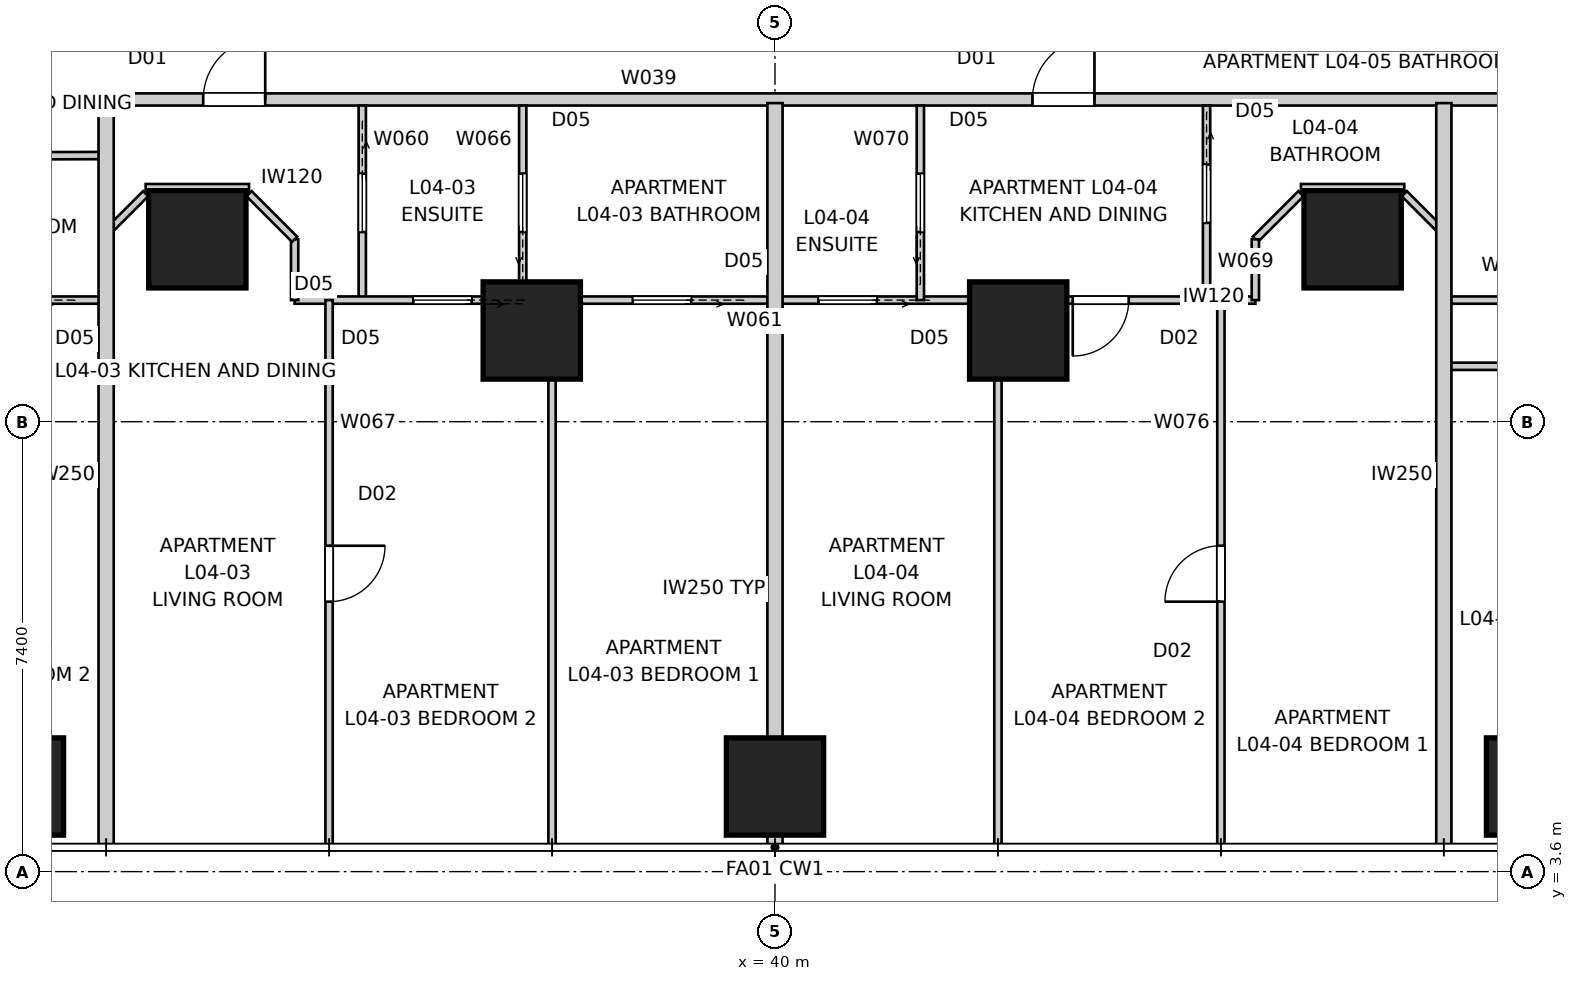
"""IFC4 building model, lengths in metres.
Left out: names, types, materials, properties, quantities, classifications, styles, units other than length and angle.
Written with IfcOpenShell. Run it as: python <this file> out.ifc"""

import sys

from ifc_helpers import new_model, si_unit, direction, frame, frame_2d, origin, origin_2d, place, context, subcontext, project, spatial, rectangle, extrude, element, fill, save


model = new_model("IFC4")
c1 = context("Model", 3, precision=1e-05, world=origin(), true_north=direction((0.0, 1.0)))
c2 = subcontext(c1, "Body", "Model", "MODEL_VIEW")
j1 = project(units=[si_unit("LENGTHUNIT", "METRE"), si_unit("PLANEANGLEUNIT", "RADIAN")], contexts=[c1])
p1 = place(None, origin())
s1 = spatial("IfcSite", under=j1, at=p1, CompositionType="ELEMENT")
p2 = place(p1, origin())
s2 = spatial("IfcBuilding", under=s1, at=p2, CompositionType="ELEMENT")
p3 = place(p2, frame((0.0, 0.0, 18.4)))
s3 = spatial("IfcBuildingStorey", under=s2, at=p3, CompositionType="ELEMENT", Elevation=18.4)
for number, where, z_axis, x_axis in (
    (1, (27.5, 5.0, 0.0), (0.0, 0.0, 1.0), (1.0, 0.0, 0.0)),
    (2, (40.0, 5.0, 0.0), (0.0, 0.0, 1.0), (1.0, 0.0, 0.0)),
    (3, (52.5, 5.0, 0.0), (0.0, 0.0, 1.0), (1.0, 0.0, 0.0)),
    (4, (30.5, 14.0, 0.0), (0.0, 0.0, 1.0), (1.0, 0.0, 0.0)),
    (5, (36.0, 12.5, 0.0), (0.0, 0.0, 1.0), (1.0, 0.0, 0.0)),
    (6, (44.0, 12.5, 0.0), (0.0, 0.0, 1.0), (1.0, 0.0, 0.0)),
    (7, (49.5, 14.0, 0.0), (0.0, 0.0, 1.0), (1.0, 0.0, 0.0)),
):
    element("IfcColumn", number, at=place(p3, frame(where, z_axis=z_axis, x_axis=x_axis)), inside=s3, PredefinedType="COLUMN", context=c2, shape_type="SweptSolid", body=[
        extrude(rectangle(XDim=1.6, YDim=1.6, at=origin_2d()), origin(), (0.0, 0.0, 1.0), 3.4),
    ])
p4 = place(p3, frame((25.5, 16.3, 0.0), z_axis=(0.0, 0.0, 1.0), x_axis=(1.0, 0.0, 0.0)))
e8 = element("IfcWall", 8, at=p4, inside=s3, PredefinedType="PARTITIONING", context=c2, shape_type="SweptSolid", body=[
    extrude(rectangle(XDim=29.0, YDim=0.2, at=frame_2d((14.5, 0.0))), origin(), (0.0, 0.0, 1.0), 3.25),
])
p5 = place(p4, frame((18.734, 0.0, 0.0)))
e9 = element("IfcOpeningElement", 9, at=p5, cuts=e8, PredefinedType="OPENING", context=c2, shape_type="SweptSolid", body=[
    extrude(rectangle(XDim=1.02, YDim=2.34, at=frame_2d((0.51, 1.17))), frame((0.0, 0.11, 0.0), z_axis=(0.0, -1.0, 0.0), x_axis=(1.0, 0.0, 0.0)), (0.0, 0.0, 1.0), 0.22),
])
p6 = place(p4, frame((5.096, 0.0, 0.0)))
e10 = element("IfcOpeningElement", 10, at=p6, cuts=e8, PredefinedType="OPENING", context=c2, shape_type="SweptSolid", body=[
    extrude(rectangle(XDim=1.02, YDim=2.34, at=frame_2d((0.51, 1.17))), frame((0.0, 0.11, 0.0), z_axis=(0.0, -1.0, 0.0), x_axis=(1.0, 0.0, 0.0)), (0.0, 0.0, 1.0), 0.22),
])
p7 = place(p3, frame((29.0, 4.0, 0.0), z_axis=(0.0, 0.0, 1.0), x_axis=(0.0, 1.0, 0.0)))
e11 = element("IfcWall", 11, at=p7, inside=s3, PredefinedType="PARTITIONING", context=c2, shape_type="SweptSolid", body=[
    extrude(rectangle(XDim=12.24, YDim=0.25, at=frame_2d((6.12, 0.0))), origin(), (0.0, 0.0, 1.0), 3.25),
])
p8 = place(p3, frame((40.0, 4.0, 0.0), z_axis=(0.0, 0.0, 1.0), x_axis=(0.0, 1.0, 0.0)))
e12 = element("IfcWall", 12, at=p8, inside=s3, PredefinedType="PARTITIONING", context=c2, shape_type="SweptSolid", body=[
    extrude(rectangle(XDim=8.5, YDim=0.25, at=frame_2d((4.25, 0.0))), origin(), (0.0, 0.0, 1.0), 3.25),
])
p9 = place(p3, frame((40.0, 12.5, 0.0), z_axis=(0.0, 0.0, 1.0), x_axis=(0.0, 1.0, 0.0)))
e13 = element("IfcWall", 13, at=p9, inside=s3, PredefinedType="PARTITIONING", context=c2, shape_type="SweptSolid", body=[
    extrude(rectangle(XDim=3.74, YDim=0.25, at=frame_2d((1.87, 0.0))), origin(), (0.0, 0.0, 1.0), 2.795),
])
p10 = place(p3, frame((51.0, 4.0, 0.0), z_axis=(0.0, 0.0, 1.0), x_axis=(0.0, 1.0, 0.0)))
e14 = element("IfcWall", 14, at=p10, inside=s3, PredefinedType="PARTITIONING", context=c2, shape_type="SweptSolid", body=[
    extrude(rectangle(XDim=12.24, YDim=0.25, at=frame_2d((6.12, 0.0))), origin(), (0.0, 0.0, 1.0), 3.25),
])
p11 = place(p3, frame((29.0, 15.378, 0.0), z_axis=(0.0, 0.0, 1.0), x_axis=(-0.999995589081, -0.002970154664, 0.0)))
e15 = element("IfcWall", 15, at=p11, inside=s3, PredefinedType="PARTITIONING", context=c2, shape_type="SweptSolid", body=[
    extrude(rectangle(XDim=14.96, YDim=0.12, at=frame_2d((7.48, 0.0))), origin(), (0.0, 0.0, 1.0), 2.638),
])
p12 = place(p11, frame((3.57, 0.0, 0.0)))
e16 = element("IfcOpeningElement", 16, at=p12, cuts=e15, PredefinedType="OPENING", context=c2, shape_type="SweptSolid", body=[
    extrude(rectangle(XDim=0.96, YDim=2.1, at=frame_2d((0.48, 1.05))), frame((0.0, 0.07, 0.0), z_axis=(0.0, -1.0, 0.0), x_axis=(1.0, 0.0, 0.0)), (0.0, 0.0, 1.0), 0.14),
])
p13 = place(p3, frame((29.0, 13.0, 0.0), z_axis=(0.0, 0.0, 1.0), x_axis=(-1.0, 0.0, 0.0)))
e17 = element("IfcWall", 17, at=p13, inside=s3, PredefinedType="PARTITIONING", context=c2, shape_type="SweptSolid", body=[
    extrude(rectangle(XDim=6.0, YDim=0.12, at=frame_2d((3.0, 0.0))), origin(), (0.0, 0.0, 1.0), 3.25),
])
p14 = place(p13, frame((1.378, 0.0, 0.0)))
e18 = element("IfcOpeningElement", 18, at=p14, cuts=e17, PredefinedType="OPENING", context=c2, shape_type="SweptSolid", body=[
    extrude(rectangle(XDim=0.96, YDim=2.1, at=frame_2d((0.48, 1.05))), frame((0.0, 0.07, 0.0), z_axis=(0.0, -1.0, 0.0), x_axis=(1.0, 0.0, 0.0)), (0.0, 0.0, 1.0), 0.14),
])
p15 = place(p13, frame((4.328, 0.0, 0.0)))
e19 = element("IfcOpeningElement", 19, at=p15, cuts=e17, PredefinedType="OPENING", context=c2, shape_type="SweptSolid", body=[
    extrude(rectangle(XDim=0.96, YDim=2.1, at=frame_2d((0.48, 1.05))), frame((0.0, 0.07, 0.0), z_axis=(0.0, -1.0, 0.0), x_axis=(1.0, 0.0, 0.0)), (0.0, 0.0, 1.0), 0.14),
])
p16 = place(p3, frame((33.212, 16.2, 0.0), z_axis=(0.0, 0.0, 1.0), x_axis=(0.0, -1.0, 0.0)))
e20 = element("IfcWall", 20, at=p16, inside=s3, PredefinedType="PARTITIONING", context=c2, shape_type="SweptSolid", body=[
    extrude(rectangle(XDim=3.2, YDim=0.12, at=frame_2d((1.6, 0.0))), origin(), (0.0, 0.0, 1.0), 3.25),
])
p17 = place(p16, frame((1.12, 0.0, 0.0)))
e21 = element("IfcOpeningElement", 21, at=p17, cuts=e20, PredefinedType="OPENING", context=c2, shape_type="SweptSolid", body=[
    extrude(rectangle(XDim=0.96, YDim=2.1, at=frame_2d((0.48, 1.05))), frame((0.0, 0.07, 0.0), z_axis=(0.0, -1.0, 0.0), x_axis=(1.0, 0.0, 0.0)), (0.0, 0.0, 1.0), 0.14),
])
p18 = place(p3, frame((47.9, 13.0, 0.0), z_axis=(0.0, 0.0, 1.0), x_axis=(-1.0, 0.0, 0.0)))
e22 = element("IfcWall", 22, at=p18, inside=s3, PredefinedType="PARTITIONING", context=c2, shape_type="SweptSolid", body=[
    extrude(rectangle(XDim=15.8, YDim=0.12, at=frame_2d((7.9, 0.0))), origin(), (0.0, 0.0, 1.0), 2.55),
])
p19 = place(p18, frame((2.083, 0.0, 0.0)))
e23 = element("IfcOpeningElement", 23, at=p19, cuts=e22, PredefinedType="OPENING", context=c2, shape_type="SweptSolid", body=[
    extrude(rectangle(XDim=0.92, YDim=2.34, at=frame_2d((0.46, 1.17))), frame((0.0, 0.07, 0.0), z_axis=(0.0, -1.0, 0.0), x_axis=(1.0, 0.0, 0.0)), (0.0, 0.0, 1.0), 0.14),
])
p20 = place(p18, frame((6.225, 0.0, 0.0)))
e24 = element("IfcOpeningElement", 24, at=p20, cuts=e22, PredefinedType="OPENING", context=c2, shape_type="SweptSolid", body=[
    extrude(rectangle(XDim=0.96, YDim=2.1, at=frame_2d((0.48, 1.05))), frame((0.0, 0.07, 0.0), z_axis=(0.0, -1.0, 0.0), x_axis=(1.0, 0.0, 0.0)), (0.0, 0.0, 1.0), 0.14),
])
p21 = place(p18, frame((12.888, 0.0, 0.0)))
e25 = element("IfcOpeningElement", 25, at=p21, cuts=e22, PredefinedType="OPENING", context=c2, shape_type="SweptSolid", body=[
    extrude(rectangle(XDim=0.96, YDim=2.1, at=frame_2d((0.48, 1.05))), frame((0.0, 0.07, 0.0), z_axis=(0.0, -1.0, 0.0), x_axis=(1.0, 0.0, 0.0)), (0.0, 0.0, 1.0), 0.14),
])
p22 = place(p18, frame((9.278, 0.0, 0.0)))
e26 = element("IfcOpeningElement", 26, at=p22, cuts=e22, PredefinedType="OPENING", context=c2, shape_type="SweptSolid", body=[
    extrude(rectangle(XDim=0.96, YDim=2.1, at=frame_2d((0.48, 1.05))), frame((0.0, 0.07, 0.0), z_axis=(0.0, -1.0, 0.0), x_axis=(1.0, 0.0, 0.0)), (0.0, 0.0, 1.0), 0.14),
])
p23 = place(p3, frame((32.1, 13.0, 0.0), z_axis=(0.0, 0.0, 1.0), x_axis=(0.0, 1.0, 0.0)))
e27 = element("IfcWall", 27, at=p23, inside=s3, PredefinedType="PARTITIONING", context=c2, shape_type="SweptSolid", body=[
    extrude(rectangle(XDim=1.0, YDim=0.12, at=frame_2d((0.5, 0.0))), origin(), (0.0, 0.0, 1.0), 3.25),
])
p24 = place(p3, frame((32.1, 14.0, 0.0), z_axis=(0.0, 0.0, 1.0), x_axis=(-0.707106781187, 0.707106781187, 0.0)))
e28 = element("IfcWall", 28, at=p24, inside=s3, PredefinedType="PARTITIONING", context=c2, shape_type="SweptSolid", body=[
    extrude(rectangle(XDim=1.061, YDim=0.12, at=frame_2d((0.53, 0.0))), origin(), (0.0, 0.0, 1.0), 3.25),
])
p25 = place(p3, frame((31.35, 14.85, 0.0), z_axis=(0.0, 0.0, 1.0), x_axis=(-1.0, 0.0, 0.0)))
e29 = element("IfcWall", 29, at=p25, inside=s3, PredefinedType="PARTITIONING", context=c2, shape_type="SweptSolid", body=[
    extrude(rectangle(XDim=1.7, YDim=0.12, at=frame_2d((0.85, 0.0))), origin(), (0.0, 0.0, 1.0), 3.25),
])
p26 = place(p3, frame((29.65, 14.75, 0.0), z_axis=(0.0, 0.0, 1.0), x_axis=(-0.707106781187, -0.707106781187, 0.0)))
e30 = element("IfcWall", 30, at=p26, inside=s3, PredefinedType="PARTITIONING", context=c2, shape_type="SweptSolid", body=[
    extrude(rectangle(XDim=0.919, YDim=0.12, at=frame_2d((0.459, 0.0))), origin(), (0.0, 0.0, 1.0), 3.25),
])
p27 = place(p3, frame((35.851, 13.0, 0.0), z_axis=(0.0, 0.0, 1.0), x_axis=(0.0, 1.0, 0.0)))
e31 = element("IfcWall", 31, at=p27, inside=s3, PredefinedType="PARTITIONING", context=c2, shape_type="SweptSolid", body=[
    extrude(rectangle(XDim=3.2, YDim=0.12, at=frame_2d((1.6, 0.0))), origin(), (0.0, 0.0, 1.0), 3.25),
])
p28 = place(p27, frame((1.12, 0.0, 0.0)))
e32 = element("IfcOpeningElement", 32, at=p28, cuts=e31, PredefinedType="OPENING", context=c2, shape_type="SweptSolid", body=[
    extrude(rectangle(XDim=0.96, YDim=2.1, at=frame_2d((0.48, 1.05))), frame((0.0, 0.07, 0.0), z_axis=(0.0, -1.0, 0.0), x_axis=(1.0, 0.0, 0.0)), (0.0, 0.0, 1.0), 0.14),
])
p29 = place(p3, frame((32.667, 13.0, 0.0), z_axis=(0.0, 0.0, 1.0), x_axis=(0.0, -1.0, 0.0)))
e33 = element("IfcWall", 33, at=p29, inside=s3, PredefinedType="PARTITIONING", context=c2, shape_type="SweptSolid", body=[
    extrude(rectangle(XDim=8.96, YDim=0.12, at=frame_2d((4.48, 0.0))), origin(), (0.0, 0.0, 1.0), 3.25),
])
p30 = place(p29, frame((4.04, 0.0, 0.0)))
e34 = element("IfcOpeningElement", 34, at=p30, cuts=e33, PredefinedType="OPENING", context=c2, shape_type="SweptSolid", body=[
    extrude(rectangle(XDim=0.92, YDim=2.34, at=frame_2d((0.46, 1.17))), frame((0.0, 0.07, 0.0), z_axis=(0.0, -1.0, 0.0), x_axis=(1.0, 0.0, 0.0)), (0.0, 0.0, 1.0), 0.14),
])
p31 = place(p3, frame((36.333, 4.04, 0.0), z_axis=(0.0, 0.0, 1.0), x_axis=(0.0, 1.0, 0.0)))
e35 = element("IfcWall", 35, at=p31, inside=s3, PredefinedType="PARTITIONING", context=c2, shape_type="SweptSolid", body=[
    extrude(rectangle(XDim=8.96, YDim=0.12, at=frame_2d((4.48, 0.0))), origin(), (0.0, 0.0, 1.0), 3.25),
])
p32 = place(p3, frame((47.098, 16.2, 0.0), z_axis=(0.0, 0.0, 1.0), x_axis=(0.0, -1.0, 0.0)))
e36 = element("IfcWall", 36, at=p32, inside=s3, PredefinedType="PARTITIONING", context=c2, shape_type="SweptSolid", body=[
    extrude(rectangle(XDim=3.2, YDim=0.12, at=frame_2d((1.6, 0.0))), origin(), (0.0, 0.0, 1.0), 3.25),
])
p33 = place(p32, frame((0.97, 0.0, 0.0)))
e37 = element("IfcOpeningElement", 37, at=p33, cuts=e36, PredefinedType="OPENING", context=c2, shape_type="SweptSolid", body=[
    extrude(rectangle(XDim=0.96, YDim=2.1, at=frame_2d((0.48, 1.05))), frame((0.0, 0.07, 0.0), z_axis=(0.0, -1.0, 0.0), x_axis=(1.0, 0.0, 0.0)), (0.0, 0.0, 1.0), 0.14),
])
p34 = place(p3, frame((42.391, 13.0, 0.0), z_axis=(0.0, 0.0, 1.0), x_axis=(0.0, 1.0, 0.0)))
e38 = element("IfcWall", 38, at=p34, inside=s3, PredefinedType="PARTITIONING", context=c2, shape_type="SweptSolid", body=[
    extrude(rectangle(XDim=3.2, YDim=0.12, at=frame_2d((1.6, 0.0))), origin(), (0.0, 0.0, 1.0), 3.25),
])
p35 = place(p34, frame((1.12, 0.0, 0.0)))
e39 = element("IfcOpeningElement", 39, at=p35, cuts=e38, PredefinedType="OPENING", context=c2, shape_type="SweptSolid", body=[
    extrude(rectangle(XDim=0.96, YDim=2.1, at=frame_2d((0.48, 1.05))), frame((0.0, 0.07, 0.0), z_axis=(0.0, -1.0, 0.0), x_axis=(1.0, 0.0, 0.0)), (0.0, 0.0, 1.0), 0.14),
])
p36 = place(p3, frame((51.0, 14.1, 0.0), z_axis=(0.0, 0.0, 1.0), x_axis=(-0.707106781187, 0.707106781187, 0.0)))
e40 = element("IfcWall", 40, at=p36, inside=s3, PredefinedType="PARTITIONING", context=c2, shape_type="SweptSolid", body=[
    extrude(rectangle(XDim=0.919, YDim=0.12, at=frame_2d((0.459, 0.0))), origin(), (0.0, 0.0, 1.0), 3.25),
])
p37 = place(p3, frame((50.35, 14.85, 0.0), z_axis=(0.0, 0.0, 1.0), x_axis=(-1.0, 0.0, 0.0)))
e41 = element("IfcWall", 41, at=p37, inside=s3, PredefinedType="PARTITIONING", context=c2, shape_type="SweptSolid", body=[
    extrude(rectangle(XDim=1.7, YDim=0.12, at=frame_2d((0.85, 0.0))), origin(), (0.0, 0.0, 1.0), 3.25),
])
p38 = place(p3, frame((48.65, 14.75, 0.0), z_axis=(0.0, 0.0, 1.0), x_axis=(-0.707106781187, -0.707106781187, 0.0)))
e42 = element("IfcWall", 42, at=p38, inside=s3, PredefinedType="PARTITIONING", context=c2, shape_type="SweptSolid", body=[
    extrude(rectangle(XDim=1.061, YDim=0.12, at=frame_2d((0.53, 0.0))), origin(), (0.0, 0.0, 1.0), 3.25),
])
p39 = place(p3, frame((47.9, 14.0, 0.0), z_axis=(0.0, 0.0, 1.0), x_axis=(0.0, -1.0, 0.0)))
e43 = element("IfcWall", 43, at=p39, inside=s3, PredefinedType="PARTITIONING", context=c2, shape_type="SweptSolid", body=[
    extrude(rectangle(XDim=1.0, YDim=0.12, at=frame_2d((0.5, 0.0))), origin(), (0.0, 0.0, 1.0), 3.25),
])
p40 = place(p3, frame((43.667, 13.0, 0.0), z_axis=(0.0, 0.0, 1.0), x_axis=(0.0, -1.0, 0.0)))
e44 = element("IfcWall", 44, at=p40, inside=s3, PredefinedType="PARTITIONING", context=c2, shape_type="SweptSolid", body=[
    extrude(rectangle(XDim=8.96, YDim=0.12, at=frame_2d((4.48, 0.0))), origin(), (0.0, 0.0, 1.0), 3.25),
])
p41 = place(p3, frame((47.333, 4.04, 0.0), z_axis=(0.0, 0.0, 1.0), x_axis=(0.0, 1.0, 0.0)))
e45 = element("IfcWall", 45, at=p41, inside=s3, PredefinedType="PARTITIONING", context=c2, shape_type="SweptSolid", body=[
    extrude(rectangle(XDim=8.96, YDim=0.12, at=frame_2d((4.48, 0.0))), origin(), (0.0, 0.0, 1.0), 3.25),
])
p42 = place(p41, frame((4.0, 0.0, 0.0)))
e46 = element("IfcOpeningElement", 46, at=p42, cuts=e45, PredefinedType="OPENING", context=c2, shape_type="SweptSolid", body=[
    extrude(rectangle(XDim=0.92, YDim=2.34, at=frame_2d((0.46, 1.17))), frame((0.0, 0.07, 0.0), z_axis=(0.0, -1.0, 0.0), x_axis=(1.0, 0.0, 0.0)), (0.0, 0.0, 1.0), 0.14),
])
p43 = place(p3, frame((57.0, 13.0, 0.0), z_axis=(0.0, 0.0, 1.0), x_axis=(-1.0, 0.0, 0.0)))
e47 = element("IfcWall", 47, at=p43, inside=s3, PredefinedType="PARTITIONING", context=c2, shape_type="SweptSolid", body=[
    extrude(rectangle(XDim=6.0, YDim=0.12, at=frame_2d((3.0, 0.0))), origin(), (0.0, 0.0, 1.0), 3.25),
])
p44 = place(p3, frame((65.96, 11.911, 0.0), z_axis=(0.0, 0.0, 1.0), x_axis=(-1.0, 0.0, 0.0)))
e48 = element("IfcWall", 48, at=p44, inside=s3, PredefinedType="PARTITIONING", context=c2, shape_type="SweptSolid", body=[
    extrude(rectangle(XDim=14.96, YDim=0.12, at=frame_2d((7.48, 0.0))), origin(), (0.0, 0.0, 1.0), 3.25),
])
p45 = place(p44, frame((7.742, 0.0, 0.0)))
e49 = element("IfcOpeningElement", 49, at=p45, cuts=e48, PredefinedType="OPENING", context=c2, shape_type="SweptSolid", body=[
    extrude(rectangle(XDim=0.92, YDim=2.34, at=frame_2d((0.46, 1.17))), frame((0.0, 0.07, 0.0), z_axis=(0.0, -1.0, 0.0), x_axis=(1.0, 0.0, 0.0)), (0.0, 0.0, 1.0), 0.14),
])
p46 = place(p44, frame((12.642, 0.0, 0.0)))
e50 = element("IfcOpeningElement", 50, at=p46, cuts=e48, PredefinedType="OPENING", context=c2, shape_type="SweptSolid", body=[
    extrude(rectangle(XDim=0.92, YDim=2.34, at=frame_2d((0.46, 1.17))), frame((0.0, 0.07, 0.0), z_axis=(0.0, -1.0, 0.0), x_axis=(1.0, 0.0, 0.0)), (0.0, 0.0, 1.0), 0.14),
])
p47 = place(p5, origin())
e51 = element("IfcDoor", 51, at=p47, inside=s3, OperationType="SINGLE_SWING_RIGHT", PredefinedType="DOOR", context=c2, shape_type="SweptSolid", body=[
    extrude(rectangle(XDim=1.02, YDim=2.34, at=frame_2d((0.51, 1.17))), frame((0.0, 0.025, 0.0), z_axis=(0.0, -1.0, 0.0), x_axis=(1.0, 0.0, 0.0)), (0.0, 0.0, 1.0), 0.05),
])
fill(e9, e51)
p48 = place(p6, origin())
e52 = element("IfcDoor", 52, at=p48, inside=s3, OperationType="SINGLE_SWING_RIGHT", PredefinedType="DOOR", context=c2, shape_type="SweptSolid", body=[
    extrude(rectangle(XDim=1.02, YDim=2.34, at=frame_2d((0.51, 1.17))), frame((0.0, 0.025, 0.0), z_axis=(0.0, -1.0, 0.0), x_axis=(1.0, 0.0, 0.0)), (0.0, 0.0, 1.0), 0.05),
])
fill(e10, e52)
p49 = place(p19, origin())
e53 = element("IfcDoor", 53, at=p49, inside=s3, OperationType="SINGLE_SWING_RIGHT", PredefinedType="DOOR", context=c2, shape_type="SweptSolid", body=[
    extrude(rectangle(XDim=0.92, YDim=2.34, at=frame_2d((0.46, 1.17))), frame((0.0, 0.025, 0.0), z_axis=(0.0, -1.0, 0.0), x_axis=(1.0, 0.0, 0.0)), (0.0, 0.0, 1.0), 0.05),
])
fill(e23, e53)
p50 = place(p33, origin())
e54 = element("IfcDoor", 54, at=p50, inside=s3, OperationType="SLIDING_TO_LEFT", PredefinedType="DOOR", context=c2, shape_type="SweptSolid", body=[
    extrude(rectangle(XDim=0.96, YDim=2.1, at=frame_2d((0.48, 1.05))), frame((0.0, 0.025, 0.0), z_axis=(0.0, -1.0, 0.0), x_axis=(1.0, 0.0, 0.0)), (0.0, 0.0, 1.0), 0.05),
])
fill(e37, e54)
p51 = place(p35, origin())
e55 = element("IfcDoor", 55, at=p51, inside=s3, OperationType="SLIDING_TO_LEFT", PredefinedType="DOOR", context=c2, shape_type="SweptSolid", body=[
    extrude(rectangle(XDim=0.96, YDim=2.1, at=frame_2d((0.48, 1.05))), frame((0.0, 0.025, 0.0), z_axis=(0.0, -1.0, 0.0), x_axis=(1.0, 0.0, 0.0)), (0.0, 0.0, 1.0), 0.05),
])
fill(e39, e55)
p52 = place(p17, origin())
e56 = element("IfcDoor", 56, at=p52, inside=s3, OperationType="SLIDING_TO_LEFT", PredefinedType="DOOR", context=c2, shape_type="SweptSolid", body=[
    extrude(rectangle(XDim=0.96, YDim=2.1, at=frame_2d((0.48, 1.05))), frame((0.0, 0.025, 0.0), z_axis=(0.0, -1.0, 0.0), x_axis=(1.0, 0.0, 0.0)), (0.0, 0.0, 1.0), 0.05),
])
fill(e21, e56)
p53 = place(p20, origin())
e57 = element("IfcDoor", 57, at=p53, inside=s3, OperationType="SLIDING_TO_LEFT", PredefinedType="DOOR", context=c2, shape_type="SweptSolid", body=[
    extrude(rectangle(XDim=0.96, YDim=2.1, at=frame_2d((0.48, 1.05))), frame((0.0, 0.025, 0.0), z_axis=(0.0, -1.0, 0.0), x_axis=(1.0, 0.0, 0.0)), (0.0, 0.0, 1.0), 0.05),
])
fill(e24, e57)
p54 = place(p28, origin())
e58 = element("IfcDoor", 58, at=p54, inside=s3, OperationType="SLIDING_TO_LEFT", PredefinedType="DOOR", context=c2, shape_type="SweptSolid", body=[
    extrude(rectangle(XDim=0.96, YDim=2.1, at=frame_2d((0.48, 1.05))), frame((0.0, 0.025, 0.0), z_axis=(0.0, -1.0, 0.0), x_axis=(1.0, 0.0, 0.0)), (0.0, 0.0, 1.0), 0.05),
])
fill(e32, e58)
p55 = place(p21, origin())
e59 = element("IfcDoor", 59, at=p55, inside=s3, OperationType="SLIDING_TO_LEFT", PredefinedType="DOOR", context=c2, shape_type="SweptSolid", body=[
    extrude(rectangle(XDim=0.96, YDim=2.1, at=frame_2d((0.48, 1.05))), frame((0.0, 0.025, 0.0), z_axis=(0.0, -1.0, 0.0), x_axis=(1.0, 0.0, 0.0)), (0.0, 0.0, 1.0), 0.05),
])
fill(e25, e59)
p56 = place(p22, origin())
e60 = element("IfcDoor", 60, at=p56, inside=s3, OperationType="SLIDING_TO_LEFT", PredefinedType="DOOR", context=c2, shape_type="SweptSolid", body=[
    extrude(rectangle(XDim=0.96, YDim=2.1, at=frame_2d((0.48, 1.05))), frame((0.0, 0.025, 0.0), z_axis=(0.0, -1.0, 0.0), x_axis=(1.0, 0.0, 0.0)), (0.0, 0.0, 1.0), 0.05),
])
fill(e26, e60)
p57 = place(p42, origin())
e61 = element("IfcDoor", 61, at=p57, inside=s3, OperationType="SINGLE_SWING_LEFT", PredefinedType="DOOR", context=c2, shape_type="SweptSolid", body=[
    extrude(rectangle(XDim=0.92, YDim=2.34, at=frame_2d((0.46, 1.17))), frame((0.0, 0.025, 0.0), z_axis=(0.0, -1.0, 0.0), x_axis=(1.0, 0.0, 0.0)), (0.0, 0.0, 1.0), 0.05),
])
fill(e46, e61)
p58 = place(p30, origin())
e62 = element("IfcDoor", 62, at=p58, inside=s3, OperationType="SINGLE_SWING_LEFT", PredefinedType="DOOR", context=c2, shape_type="SweptSolid", body=[
    extrude(rectangle(XDim=0.92, YDim=2.34, at=frame_2d((0.46, 1.17))), frame((0.0, 0.025, 0.0), z_axis=(0.0, -1.0, 0.0), x_axis=(1.0, 0.0, 0.0)), (0.0, 0.0, 1.0), 0.05),
])
fill(e34, e62)
save(model, sys.argv[1])
